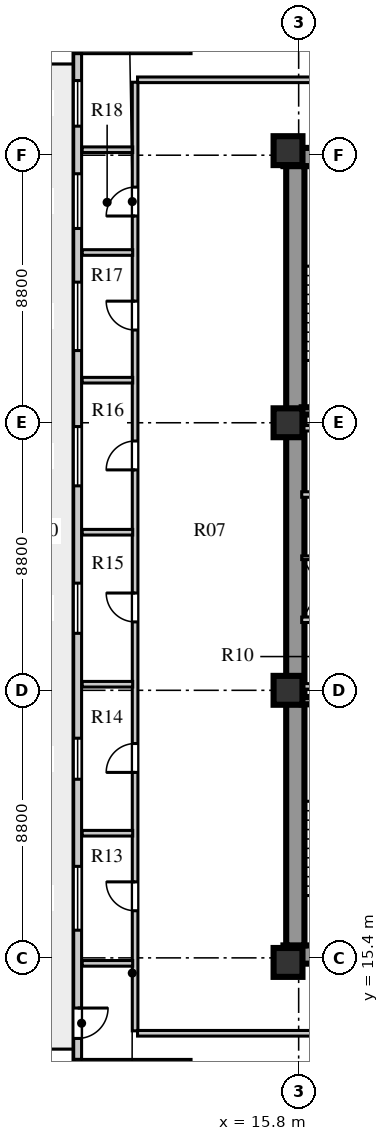
"""IFC4 building model, lengths in metres.
Left out: names, types, materials, properties, quantities, classifications, styles, units other than length and angle.
Written with IfcOpenShell. Run it as: python <this file> out.ifc"""

import sys

from ifc_helpers import new_model, si_unit, direction, frame, frame_2d, origin, origin_2d, place, context, subcontext, project, spatial, rectangle, extrude, element, fill, save


model = new_model("IFC4")
c1 = context("Model", 3, precision=1e-05, world=origin(), true_north=direction((0.0, 1.0)))
c2 = subcontext(c1, "Body", "Model", "MODEL_VIEW")
j1 = project(units=[si_unit("LENGTHUNIT", "METRE"), si_unit("PLANEANGLEUNIT", "RADIAN")], contexts=[c1])
p1 = place(None, origin())
s1 = spatial("IfcSite", under=j1, at=p1, CompositionType="ELEMENT")
p2 = place(p1, origin())
s2 = spatial("IfcBuilding", under=s1, at=p2, CompositionType="ELEMENT")
p3 = place(p2, frame((0.0, 0.0, 82.0)))
s3 = spatial("IfcBuildingStorey", under=s2, at=p3, CompositionType="ELEMENT", Elevation=82.0)
for number, where, z_axis, x_axis in (
    (1, (15.3, 15.51, 0.0), (0.0, 0.0, 1.0), (1.0, 0.0, 0.0)),
    (2, (15.3, 41.74, 0.0), (0.0, 0.0, 1.0), (1.0, 0.0, 0.0)),
):
    element("IfcWall", number, at=place(p3, frame(where, z_axis=z_axis, x_axis=x_axis)), inside=s3, PredefinedType="SHEAR", context=c2, shape_type="SweptSolid", body=[
        extrude(rectangle(XDim=9.88, YDim=0.6, at=frame_2d((4.94, 0.0))), origin(), (0.0, 0.0, 1.0), 3.74),
    ])
p4 = place(p3, frame((15.69, 15.81, 0.0), z_axis=(0.0, 0.0, 1.0), x_axis=(0.0, 1.0, 0.0)))
e3 = element("IfcWall", 3, at=p4, inside=s3, PredefinedType="SHEAR", context=c2, shape_type="SweptSolid", body=[
    extrude(rectangle(XDim=25.63, YDim=0.6, at=frame_2d((12.815, 0.0))), origin(), (0.0, 0.0, 1.0), 3.74),
])
for number, where, z_axis, x_axis in (
    (4, (15.45, 15.25, 0.0), (0.0, 0.0, 1.0), (1.0, 0.0, 0.0)),
    (5, (15.45, 24.2, 0.0), (0.0, 0.0, 1.0), (1.0, 0.0, 0.0)),
    (6, (15.45, 33.0, 0.0), (0.0, 0.0, 1.0), (1.0, 0.0, 0.0)),
    (7, (15.45, 41.95, 0.0), (0.0, 0.0, 1.0), (1.0, 0.0, 0.0)),
):
    element("IfcColumn", number, at=place(p3, frame(where, z_axis=z_axis, x_axis=x_axis)), inside=s3, PredefinedType="COLUMN", context=c2, shape_type="SweptSolid", body=[
        extrude(rectangle(XDim=0.95, YDim=0.95, at=origin_2d()), origin(), (0.0, 0.0, 1.0), 3.74),
    ])
p5 = place(p3, frame((12.26, 45.27, 0.0), z_axis=(0.0, 0.0, 1.0), x_axis=(-1.0, 0.0, 0.0)))
e8 = element("IfcWall", 8, at=p5, inside=s3, PredefinedType="SOLIDWALL", context=c2, shape_type="SweptSolid", body=[
    extrude(rectangle(XDim=3.86, YDim=0.26, at=frame_2d((1.93, 0.0))), origin(), (0.0, 0.0, 1.0), 3.74),
])
p6 = place(p3, frame((8.53, 45.14, 0.0), z_axis=(0.0, 0.0, 1.0), x_axis=(0.0, -1.0, 0.0)))
e9 = element("IfcWall", 9, at=p6, inside=s3, PredefinedType="SOLIDWALL", context=c2, shape_type="SweptSolid", body=[
    extrude(rectangle(XDim=33.08, YDim=0.26, at=frame_2d((16.54, 0.0))), origin(), (0.0, 0.0, 1.0), 3.74),
])
p7 = place(p6, frame((31.39, 0.0, 0.0)))
e10 = element("IfcOpeningElement", 10, at=p7, cuts=e9, PredefinedType="OPENING", context=c2, shape_type="SweptSolid", body=[
    extrude(rectangle(XDim=1.0, YDim=2.05, at=frame_2d((0.5, 1.025))), frame((0.0, 0.14, 0.0), z_axis=(0.0, -1.0, 0.0), x_axis=(1.0, 0.0, 0.0)), (0.0, 0.0, 1.0), 0.28),
])
p8 = place(p6, frame((26.73, 0.0, 0.8)))
e11 = element("IfcOpeningElement", 11, at=p8, cuts=e9, PredefinedType="OPENING", context=c2, shape_type="SweptSolid", body=[
    extrude(rectangle(XDim=2.1, YDim=1.95, at=frame_2d((1.05, 0.975))), frame((0.0, 0.14, 0.0), z_axis=(0.0, -1.0, 0.0), x_axis=(1.0, 0.0, 0.0)), (0.0, 0.0, 1.0), 0.28),
])
p9 = place(p6, frame((22.515, 0.0, 0.8)))
e12 = element("IfcOpeningElement", 12, at=p9, cuts=e9, PredefinedType="OPENING", context=c2, shape_type="SweptSolid", body=[
    extrude(rectangle(XDim=1.35, YDim=1.9, at=frame_2d((0.675, 0.95))), frame((0.0, 0.14, 0.0), z_axis=(0.0, -1.0, 0.0), x_axis=(1.0, 0.0, 0.0)), (0.0, 0.0, 1.0), 0.28),
])
p10 = place(p6, frame((17.415, 0.0, 0.8)))
e13 = element("IfcOpeningElement", 13, at=p10, cuts=e9, PredefinedType="OPENING", context=c2, shape_type="SweptSolid", body=[
    extrude(rectangle(XDim=1.65, YDim=1.95, at=frame_2d((0.825, 0.975))), frame((0.0, 0.14, 0.0), z_axis=(0.0, -1.0, 0.0), x_axis=(1.0, 0.0, 0.0)), (0.0, 0.0, 1.0), 0.28),
])
p11 = place(p6, frame((12.265, 0.0, 0.8)))
e14 = element("IfcOpeningElement", 14, at=p11, cuts=e9, PredefinedType="OPENING", context=c2, shape_type="SweptSolid", body=[
    extrude(rectangle(XDim=1.95, YDim=2.0, at=frame_2d((0.975, 1.0))), frame((0.0, 0.14, 0.0), z_axis=(0.0, -1.0, 0.0), x_axis=(1.0, 0.0, 0.0)), (0.0, 0.0, 1.0), 0.28),
])
p12 = place(p6, frame((7.515, 0.0, 0.8)))
e15 = element("IfcOpeningElement", 15, at=p12, cuts=e9, PredefinedType="OPENING", context=c2, shape_type="SweptSolid", body=[
    extrude(rectangle(XDim=2.25, YDim=2.0, at=frame_2d((1.125, 1.0))), frame((0.0, 0.14, 0.0), z_axis=(0.0, -1.0, 0.0), x_axis=(1.0, 0.0, 0.0)), (0.0, 0.0, 1.0), 0.28),
])
p13 = place(p6, frame((3.95, 0.0, 0.8)))
e16 = element("IfcOpeningElement", 16, at=p13, cuts=e9, PredefinedType="OPENING", context=c2, shape_type="SweptSolid", body=[
    extrude(rectangle(XDim=1.8, YDim=2.0, at=frame_2d((0.9, 1.0))), frame((0.0, 0.14, 0.0), z_axis=(0.0, -1.0, 0.0), x_axis=(1.0, 0.0, 0.0)), (0.0, 0.0, 1.0), 0.28),
])
p14 = place(p6, frame((0.885, 0.0, 0.8)))
e17 = element("IfcOpeningElement", 17, at=p14, cuts=e9, PredefinedType="OPENING", context=c2, shape_type="SweptSolid", body=[
    extrude(rectangle(XDim=1.5, YDim=2.0, at=frame_2d((0.75, 1.0))), frame((0.0, 0.14, 0.0), z_axis=(0.0, -1.0, 0.0), x_axis=(1.0, 0.0, 0.0)), (0.0, 0.0, 1.0), 0.28),
])
p15 = place(p3, frame((8.4, 11.93, 0.0), z_axis=(0.0, 0.0, 1.0), x_axis=(1.0, 0.0, 0.0)))
e18 = element("IfcWall", 18, at=p15, inside=s3, PredefinedType="SOLIDWALL", context=c2, shape_type="SweptSolid", body=[
    extrude(rectangle(XDim=3.86, YDim=0.26, at=frame_2d((1.93, 0.0))), origin(), (0.0, 0.0, 1.0), 3.74),
])
p16 = place(p3, frame((15.9, 23.86, 0.0), z_axis=(0.0, 0.0, 1.0), x_axis=(1.0, 0.0, 0.0)))
e19 = element("IfcWall", 19, at=p16, inside=s3, PredefinedType="SHEAR", context=c2, shape_type="SweptSolid", body=[
    extrude(rectangle(XDim=3.52, YDim=0.24, at=frame_2d((1.76, 0.0))), origin(), (0.0, 0.0, 1.0), 4.0),
])
p17 = place(p3, frame((15.9, 26.52, 0.0), z_axis=(0.0, 0.0, 1.0), x_axis=(1.0, 0.0, 0.0)))
e20 = element("IfcWall", 20, at=p17, inside=s3, PredefinedType="SOLIDWALL", context=c2, shape_type="SweptSolid", body=[
    extrude(rectangle(XDim=8.68, YDim=0.18, at=frame_2d((4.34, 0.0))), origin(), (0.0, 0.0, 1.0), 3.74),
])
p18 = place(p17, frame((1.76, 0.0, 0.0)))
e21 = element("IfcOpeningElement", 21, at=p18, cuts=e20, PredefinedType="OPENING", context=c2, shape_type="SweptSolid", body=[
    extrude(rectangle(XDim=1.0, YDim=2.1, at=frame_2d((0.5, 1.05))), frame((0.0, 0.1, 0.0), z_axis=(0.0, -1.0, 0.0), x_axis=(1.0, 0.0, 0.0)), (0.0, 0.0, 1.0), 0.2),
])
p19 = place(p17, frame((3.6, 0.0, 0.0)))
e22 = element("IfcOpeningElement", 22, at=p19, cuts=e20, PredefinedType="OPENING", context=c2, shape_type="SweptSolid", body=[
    extrude(rectangle(XDim=1.0, YDim=2.1, at=frame_2d((0.5, 1.05))), frame((0.0, 0.1, 0.0), z_axis=(0.0, -1.0, 0.0), x_axis=(1.0, 0.0, 0.0)), (0.0, 0.0, 1.0), 0.2),
])
p20 = place(p17, frame((5.44, 0.0, 0.0)))
e23 = element("IfcOpeningElement", 23, at=p20, cuts=e20, PredefinedType="OPENING", context=c2, shape_type="SweptSolid", body=[
    extrude(rectangle(XDim=1.0, YDim=2.1, at=frame_2d((0.5, 1.05))), frame((0.0, 0.1, 0.0), z_axis=(0.0, -1.0, 0.0), x_axis=(1.0, 0.0, 0.0)), (0.0, 0.0, 1.0), 0.2),
])
p21 = place(p17, frame((7.28, 0.0, 0.0)))
e24 = element("IfcOpeningElement", 24, at=p21, cuts=e20, PredefinedType="OPENING", context=c2, shape_type="SweptSolid", body=[
    extrude(rectangle(XDim=1.0, YDim=2.1, at=frame_2d((0.5, 1.05))), frame((0.0, 0.1, 0.0), z_axis=(0.0, -1.0, 0.0), x_axis=(1.0, 0.0, 0.0)), (0.0, 0.0, 1.0), 0.2),
])
p22 = place(p3, frame((15.9, 24.33, 0.0), z_axis=(0.0, 0.0, 1.0), x_axis=(1.0, 0.0, 0.0)))
e25 = element("IfcWall", 25, at=p22, inside=s3, PredefinedType="SOLIDWALL", context=c2, shape_type="SweptSolid", body=[
    extrude(rectangle(XDim=8.68, YDim=0.18, at=frame_2d((4.34, 0.0))), origin(), (0.0, 0.0, 1.0), 3.04),
])
p23 = place(p3, frame((15.9, 28.56, 0.0), z_axis=(0.0, 0.0, 1.0), x_axis=(1.0, 0.0, 0.0)))
e26 = element("IfcWall", 26, at=p23, inside=s3, PredefinedType="PARTITIONING", context=c2, shape_type="SweptSolid", body=[
    extrude(rectangle(XDim=1.2, YDim=0.12, at=frame_2d((0.6, 0.0))), origin(), (0.0, 0.0, 1.0), 3.74),
])
p24 = place(p3, frame((15.9, 30.64, 0.0), z_axis=(0.0, 0.0, 1.0), x_axis=(1.0, 0.0, 0.0)))
e27 = element("IfcWall", 27, at=p24, inside=s3, PredefinedType="SOLIDWALL", context=c2, shape_type="SweptSolid", body=[
    extrude(rectangle(XDim=8.68, YDim=0.18, at=frame_2d((4.34, 0.0))), origin(), (0.0, 0.0, 1.0), 3.74),
])
p25 = place(p24, frame((1.76, 0.0, 0.0)))
e28 = element("IfcOpeningElement", 28, at=p25, cuts=e27, PredefinedType="OPENING", context=c2, shape_type="SweptSolid", body=[
    extrude(rectangle(XDim=1.0, YDim=2.1, at=frame_2d((0.5, 1.05))), frame((0.0, 0.1, 0.0), z_axis=(0.0, -1.0, 0.0), x_axis=(1.0, 0.0, 0.0)), (0.0, 0.0, 1.0), 0.2),
])
p26 = place(p24, frame((3.6, 0.0, 0.0)))
e29 = element("IfcOpeningElement", 29, at=p26, cuts=e27, PredefinedType="OPENING", context=c2, shape_type="SweptSolid", body=[
    extrude(rectangle(XDim=1.0, YDim=2.1, at=frame_2d((0.5, 1.05))), frame((0.0, 0.1, 0.0), z_axis=(0.0, -1.0, 0.0), x_axis=(1.0, 0.0, 0.0)), (0.0, 0.0, 1.0), 0.2),
])
p27 = place(p24, frame((5.44, 0.0, 0.0)))
e30 = element("IfcOpeningElement", 30, at=p27, cuts=e27, PredefinedType="OPENING", context=c2, shape_type="SweptSolid", body=[
    extrude(rectangle(XDim=1.0, YDim=2.1, at=frame_2d((0.5, 1.05))), frame((0.0, 0.1, 0.0), z_axis=(0.0, -1.0, 0.0), x_axis=(1.0, 0.0, 0.0)), (0.0, 0.0, 1.0), 0.2),
])
p28 = place(p24, frame((7.28, 0.0, 0.0)))
e31 = element("IfcOpeningElement", 31, at=p28, cuts=e27, PredefinedType="OPENING", context=c2, shape_type="SweptSolid", body=[
    extrude(rectangle(XDim=1.0, YDim=2.1, at=frame_2d((0.5, 1.05))), frame((0.0, 0.1, 0.0), z_axis=(0.0, -1.0, 0.0), x_axis=(1.0, 0.0, 0.0)), (0.0, 0.0, 1.0), 0.2),
])
p29 = place(p3, frame((15.9, 32.82, 0.0), z_axis=(0.0, 0.0, 1.0), x_axis=(1.0, 0.0, 0.0)))
e32 = element("IfcWall", 32, at=p29, inside=s3, PredefinedType="SOLIDWALL", context=c2, shape_type="SweptSolid", body=[
    extrude(rectangle(XDim=8.68, YDim=0.18, at=frame_2d((4.34, 0.0))), origin(), (0.0, 0.0, 1.0), 3.04),
])
p30 = place(p3, frame((15.9, 33.39, 0.0), z_axis=(0.0, 0.0, 1.0), x_axis=(1.0, 0.0, 0.0)))
e33 = element("IfcWall", 33, at=p30, inside=s3, PredefinedType="SHEAR", context=c2, shape_type="SweptSolid", body=[
    extrude(rectangle(XDim=3.52, YDim=0.24, at=frame_2d((1.76, 0.0))), origin(), (0.0, 0.0, 1.0), 4.0),
])
p31 = place(p3, frame((10.42, 13.0, 0.0), z_axis=(0.0, 0.0, 1.0), x_axis=(0.0, 1.0, 0.0)))
e34 = element("IfcWall", 34, at=p31, inside=s3, PredefinedType="SOLIDWALL", context=c2, shape_type="SweptSolid", body=[
    extrude(rectangle(XDim=31.2, YDim=0.185, at=frame_2d((15.6, 0.0))), origin(), (0.0, 0.0, 1.0), 3.74),
])
p32 = place(p31, frame((3.95, 0.0, 0.0)))
e35 = element("IfcOpeningElement", 35, at=p32, cuts=e34, PredefinedType="OPENING", context=c2, shape_type="SweptSolid", body=[
    extrude(rectangle(XDim=0.95, YDim=2.08, at=frame_2d((0.475, 1.04))), frame((0.0, 0.103, 0.0), z_axis=(0.0, -1.0, 0.0), x_axis=(1.0, 0.0, 0.0)), (0.0, 0.0, 1.0), 0.205),
])
p33 = place(p31, frame((8.5, 0.0, 0.0)))
e36 = element("IfcOpeningElement", 36, at=p33, cuts=e34, PredefinedType="OPENING", context=c2, shape_type="SweptSolid", body=[
    extrude(rectangle(XDim=0.95, YDim=2.08, at=frame_2d((0.475, 1.04))), frame((0.0, 0.103, 0.0), z_axis=(0.0, -1.0, 0.0), x_axis=(1.0, 0.0, 0.0)), (0.0, 0.0, 1.0), 0.205),
])
p34 = place(p31, frame((13.45, 0.0, 0.0)))
e37 = element("IfcOpeningElement", 37, at=p34, cuts=e34, PredefinedType="OPENING", context=c2, shape_type="SweptSolid", body=[
    extrude(rectangle(XDim=0.95, YDim=2.08, at=frame_2d((0.475, 1.04))), frame((0.0, 0.103, 0.0), z_axis=(0.0, -1.0, 0.0), x_axis=(1.0, 0.0, 0.0)), (0.0, 0.0, 1.0), 0.205),
])
p35 = place(p31, frame((18.45, 0.0, 0.0)))
e38 = element("IfcOpeningElement", 38, at=p35, cuts=e34, PredefinedType="OPENING", context=c2, shape_type="SweptSolid", body=[
    extrude(rectangle(XDim=0.95, YDim=2.08, at=frame_2d((0.475, 1.04))), frame((0.0, 0.103, 0.0), z_axis=(0.0, -1.0, 0.0), x_axis=(1.0, 0.0, 0.0)), (0.0, 0.0, 1.0), 0.205),
])
p36 = place(p31, frame((23.05, 0.0, 0.0)))
e39 = element("IfcOpeningElement", 39, at=p36, cuts=e34, PredefinedType="OPENING", context=c2, shape_type="SweptSolid", body=[
    extrude(rectangle(XDim=0.95, YDim=2.08, at=frame_2d((0.475, 1.04))), frame((0.0, 0.103, 0.0), z_axis=(0.0, -1.0, 0.0), x_axis=(1.0, 0.0, 0.0)), (0.0, 0.0, 1.0), 0.205),
])
p37 = place(p31, frame((26.8, 0.0, 0.0)))
e40 = element("IfcOpeningElement", 40, at=p37, cuts=e34, PredefinedType="OPENING", context=c2, shape_type="SweptSolid", body=[
    extrude(rectangle(XDim=0.95, YDim=2.08, at=frame_2d((0.475, 1.04))), frame((0.0, 0.103, 0.0), z_axis=(0.0, -1.0, 0.0), x_axis=(1.0, 0.0, 0.0)), (0.0, 0.0, 1.0), 0.205),
])
for number, where, z_axis, x_axis in (
    (41, (8.68, 15.22, 0.0), (0.0, 0.0, 1.0), (1.0, 0.0, 0.0)),
    (42, (8.68, 41.98, 0.0), (0.0, 0.0, 1.0), (1.0, 0.0, 0.0)),
):
    element("IfcWall", number, at=place(p3, frame(where, z_axis=z_axis, x_axis=x_axis)), inside=s3, PredefinedType="SOLIDWALL", context=c2, shape_type="SweptSolid", body=[
        extrude(rectangle(XDim=1.66, YDim=0.185, at=frame_2d((0.83, 0.0))), origin(), (0.0, 0.0, 1.0), 3.24),
    ])
p38 = place(p3, frame((10.5, 12.92, 0.0), z_axis=(0.0, 0.0, 1.0), x_axis=(1.0, 0.0, 0.0)))
e43 = element("IfcWall", 43, at=p38, inside=s3, PredefinedType="SOLIDWALL", context=c2, shape_type="SweptSolid", body=[
    extrude(rectangle(XDim=14.7, YDim=0.185, at=frame_2d((7.35, 0.0))), origin(), (0.0, 0.0, 1.0), 3.74),
])
p39 = place(p38, frame((6.2, 0.0, 0.0)))
e44 = element("IfcOpeningElement", 44, at=p39, cuts=e43, PredefinedType="OPENING", context=c2, shape_type="SweptSolid", body=[
    extrude(rectangle(XDim=1.0, YDim=2.08, at=frame_2d((0.5, 1.04))), frame((0.0, 0.103, 0.0), z_axis=(0.0, -1.0, 0.0), x_axis=(1.0, 0.0, 0.0)), (0.0, 0.0, 1.0), 0.205),
])
p40 = place(p3, frame((10.5, 44.28, 0.0), z_axis=(0.0, 0.0, 1.0), x_axis=(1.0, 0.0, 0.0)))
e45 = element("IfcWall", 45, at=p40, inside=s3, PredefinedType="SOLIDWALL", context=c2, shape_type="SweptSolid", body=[
    extrude(rectangle(XDim=14.7, YDim=0.185, at=frame_2d((7.35, 0.0))), origin(), (0.0, 0.0, 1.0), 3.74),
])
p41 = place(p40, frame((6.2, 0.0, 0.0)))
e46 = element("IfcOpeningElement", 46, at=p41, cuts=e45, PredefinedType="OPENING", context=c2, shape_type="SweptSolid", body=[
    extrude(rectangle(XDim=1.0, YDim=2.08, at=frame_2d((0.5, 1.04))), frame((0.0, 0.103, 0.0), z_axis=(0.0, -1.0, 0.0), x_axis=(1.0, 0.0, 0.0)), (0.0, 0.0, 1.0), 0.205),
])
p42 = place(p3, frame((8.68, 19.5, 0.0), z_axis=(0.0, 0.0, 1.0), x_axis=(1.0, 0.0, 0.0)))
e47 = element("IfcWall", 47, at=p42, inside=s3, PredefinedType="SOLIDWALL", context=c2, shape_type="SweptSolid", body=[
    extrude(rectangle(XDim=1.66, YDim=0.185, at=frame_2d((0.83, 0.0))), origin(), (0.0, 0.0, 1.0), 3.74),
])
p43 = place(p3, frame((8.68, 24.4, 0.0), z_axis=(0.0, 0.0, 1.0), x_axis=(1.0, 0.0, 0.0)))
e48 = element("IfcWall", 48, at=p43, inside=s3, PredefinedType="SOLIDWALL", context=c2, shape_type="SweptSolid", body=[
    extrude(rectangle(XDim=1.66, YDim=0.185, at=frame_2d((0.83, 0.0))), origin(), (0.0, 0.0, 1.0), 3.24),
])
for number, where, z_axis, x_axis in (
    (49, (8.68, 29.4, 0.0), (0.0, 0.0, 1.0), (1.0, 0.0, 0.0)),
    (50, (8.68, 34.4, 0.0), (0.0, 0.0, 1.0), (1.0, 0.0, 0.0)),
    (51, (8.68, 38.6, 0.0), (0.0, 0.0, 1.0), (1.0, 0.0, 0.0)),
):
    element("IfcWall", number, at=place(p3, frame(where, z_axis=z_axis, x_axis=x_axis)), inside=s3, PredefinedType="SOLIDWALL", context=c2, shape_type="SweptSolid", body=[
        extrude(rectangle(XDim=1.66, YDim=0.185, at=frame_2d((0.83, 0.0))), origin(), (0.0, 0.0, 1.0), 3.74),
    ])
p44 = place(p7, frame((1.0, 0.0, 0.0), z_axis=(0.0, 0.0, 1.0), x_axis=(-1.0, 0.0, 0.0)))
e52 = element("IfcDoor", 52, at=p44, inside=s3, OperationType="SINGLE_SWING_RIGHT", PredefinedType="DOOR", context=c2, shape_type="SweptSolid", body=[
    extrude(rectangle(XDim=1.0, YDim=2.05, at=frame_2d((0.5, 1.025))), frame((0.0, 0.025, 0.0), z_axis=(0.0, -1.0, 0.0), x_axis=(1.0, 0.0, 0.0)), (0.0, 0.0, 1.0), 0.05),
])
fill(e10, e52)
p45 = place(p8, origin())
e53 = element("IfcWindow", 53, at=p45, inside=s3, PartitioningType="SINGLE_PANEL", PredefinedType="WINDOW", context=c2, shape_type="SweptSolid", body=[
    extrude(rectangle(XDim=2.1, YDim=1.95, at=frame_2d((1.05, 0.975))), frame((0.0, 0.03, 0.0), z_axis=(0.0, -1.0, 0.0), x_axis=(1.0, 0.0, 0.0)), (0.0, 0.0, 1.0), 0.06),
])
fill(e11, e53)
p46 = place(p9, origin())
e54 = element("IfcWindow", 54, at=p46, inside=s3, PartitioningType="SINGLE_PANEL", PredefinedType="WINDOW", context=c2, shape_type="SweptSolid", body=[
    extrude(rectangle(XDim=1.35, YDim=1.9, at=frame_2d((0.675, 0.95))), frame((0.0, 0.03, 0.0), z_axis=(0.0, -1.0, 0.0), x_axis=(1.0, 0.0, 0.0)), (0.0, 0.0, 1.0), 0.06),
])
fill(e12, e54)
p47 = place(p10, origin())
e55 = element("IfcWindow", 55, at=p47, inside=s3, PartitioningType="SINGLE_PANEL", PredefinedType="WINDOW", context=c2, shape_type="SweptSolid", body=[
    extrude(rectangle(XDim=1.65, YDim=1.95, at=frame_2d((0.825, 0.975))), frame((0.0, 0.03, 0.0), z_axis=(0.0, -1.0, 0.0), x_axis=(1.0, 0.0, 0.0)), (0.0, 0.0, 1.0), 0.06),
])
fill(e13, e55)
p48 = place(p11, origin())
e56 = element("IfcWindow", 56, at=p48, inside=s3, PartitioningType="SINGLE_PANEL", PredefinedType="WINDOW", context=c2, shape_type="SweptSolid", body=[
    extrude(rectangle(XDim=1.95, YDim=2.0, at=frame_2d((0.975, 1.0))), frame((0.0, 0.03, 0.0), z_axis=(0.0, -1.0, 0.0), x_axis=(1.0, 0.0, 0.0)), (0.0, 0.0, 1.0), 0.06),
])
fill(e14, e56)
p49 = place(p12, origin())
e57 = element("IfcWindow", 57, at=p49, inside=s3, PartitioningType="SINGLE_PANEL", PredefinedType="WINDOW", context=c2, shape_type="SweptSolid", body=[
    extrude(rectangle(XDim=2.25, YDim=2.0, at=frame_2d((1.125, 1.0))), frame((0.0, 0.03, 0.0), z_axis=(0.0, -1.0, 0.0), x_axis=(1.0, 0.0, 0.0)), (0.0, 0.0, 1.0), 0.06),
])
fill(e15, e57)
p50 = place(p13, origin())
e58 = element("IfcWindow", 58, at=p50, inside=s3, PartitioningType="SINGLE_PANEL", PredefinedType="WINDOW", context=c2, shape_type="SweptSolid", body=[
    extrude(rectangle(XDim=1.8, YDim=2.0, at=frame_2d((0.9, 1.0))), frame((0.0, 0.03, 0.0), z_axis=(0.0, -1.0, 0.0), x_axis=(1.0, 0.0, 0.0)), (0.0, 0.0, 1.0), 0.06),
])
fill(e16, e58)
p51 = place(p14, origin())
e59 = element("IfcWindow", 59, at=p51, inside=s3, PartitioningType="SINGLE_PANEL", PredefinedType="WINDOW", context=c2, shape_type="SweptSolid", body=[
    extrude(rectangle(XDim=1.5, YDim=2.0, at=frame_2d((0.75, 1.0))), frame((0.0, 0.03, 0.0), z_axis=(0.0, -1.0, 0.0), x_axis=(1.0, 0.0, 0.0)), (0.0, 0.0, 1.0), 0.06),
])
fill(e17, e59)
p52 = place(p32, frame((0.95, 0.0, 0.0), z_axis=(0.0, 0.0, 1.0), x_axis=(-1.0, 0.0, 0.0)))
e60 = element("IfcDoor", 60, at=p52, inside=s3, OperationType="SINGLE_SWING_LEFT", PredefinedType="DOOR", context=c2, shape_type="SweptSolid", body=[
    extrude(rectangle(XDim=0.95, YDim=2.08, at=frame_2d((0.475, 1.04))), frame((0.0, 0.025, 0.0), z_axis=(0.0, -1.0, 0.0), x_axis=(1.0, 0.0, 0.0)), (0.0, 0.0, 1.0), 0.05),
])
fill(e35, e60)
p53 = place(p33, frame((0.95, 0.0, 0.0), z_axis=(0.0, 0.0, 1.0), x_axis=(-1.0, 0.0, 0.0)))
e61 = element("IfcDoor", 61, at=p53, inside=s3, OperationType="SINGLE_SWING_RIGHT", PredefinedType="DOOR", context=c2, shape_type="SweptSolid", body=[
    extrude(rectangle(XDim=0.95, YDim=2.08, at=frame_2d((0.475, 1.04))), frame((0.0, 0.025, 0.0), z_axis=(0.0, -1.0, 0.0), x_axis=(1.0, 0.0, 0.0)), (0.0, 0.0, 1.0), 0.05),
])
fill(e36, e61)
p54 = place(p34, frame((0.95, 0.0, 0.0), z_axis=(0.0, 0.0, 1.0), x_axis=(-1.0, 0.0, 0.0)))
e62 = element("IfcDoor", 62, at=p54, inside=s3, OperationType="SINGLE_SWING_LEFT", PredefinedType="DOOR", context=c2, shape_type="SweptSolid", body=[
    extrude(rectangle(XDim=0.95, YDim=2.08, at=frame_2d((0.475, 1.04))), frame((0.0, 0.025, 0.0), z_axis=(0.0, -1.0, 0.0), x_axis=(1.0, 0.0, 0.0)), (0.0, 0.0, 1.0), 0.05),
])
fill(e37, e62)
p55 = place(p35, frame((0.95, 0.0, 0.0), z_axis=(0.0, 0.0, 1.0), x_axis=(-1.0, 0.0, 0.0)))
e63 = element("IfcDoor", 63, at=p55, inside=s3, OperationType="SINGLE_SWING_RIGHT", PredefinedType="DOOR", context=c2, shape_type="SweptSolid", body=[
    extrude(rectangle(XDim=0.95, YDim=2.08, at=frame_2d((0.475, 1.04))), frame((0.0, 0.025, 0.0), z_axis=(0.0, -1.0, 0.0), x_axis=(1.0, 0.0, 0.0)), (0.0, 0.0, 1.0), 0.05),
])
fill(e38, e63)
p56 = place(p36, frame((0.95, 0.0, 0.0), z_axis=(0.0, 0.0, 1.0), x_axis=(-1.0, 0.0, 0.0)))
e64 = element("IfcDoor", 64, at=p56, inside=s3, OperationType="SINGLE_SWING_LEFT", PredefinedType="DOOR", context=c2, shape_type="SweptSolid", body=[
    extrude(rectangle(XDim=0.95, YDim=2.08, at=frame_2d((0.475, 1.04))), frame((0.0, 0.025, 0.0), z_axis=(0.0, -1.0, 0.0), x_axis=(1.0, 0.0, 0.0)), (0.0, 0.0, 1.0), 0.05),
])
fill(e39, e64)
p57 = place(p37, frame((0.95, 0.0, 0.0), z_axis=(0.0, 0.0, 1.0), x_axis=(-1.0, 0.0, 0.0)))
e65 = element("IfcDoor", 65, at=p57, inside=s3, OperationType="SINGLE_SWING_RIGHT", PredefinedType="DOOR", context=c2, shape_type="SweptSolid", body=[
    extrude(rectangle(XDim=0.95, YDim=2.08, at=frame_2d((0.475, 1.04))), frame((0.0, 0.025, 0.0), z_axis=(0.0, -1.0, 0.0), x_axis=(1.0, 0.0, 0.0)), (0.0, 0.0, 1.0), 0.05),
])
fill(e40, e65)
save(model, sys.argv[1])
